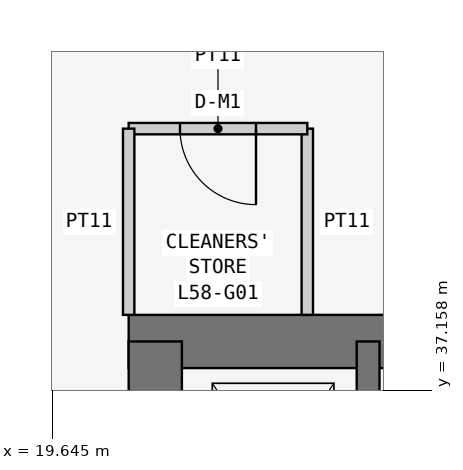
"""IFC4 building model, lengths in metres.
Left out: names, types, materials, properties, quantities, classifications, styles, units other than length and angle.
Written with IfcOpenShell. Run it as: python <this file> out.ifc"""

import sys

from ifc_helpers import new_model, si_unit, direction, frame, frame_2d, origin, place, context, subcontext, project, spatial, rectangle, extrude, element, fill, save


model = new_model("IFC4")
c1 = context("Model", 3, precision=1e-05, world=origin(), true_north=direction((0.0, 1.0)))
c2 = subcontext(c1, "Body", "Model", "MODEL_VIEW")
j1 = project(units=[si_unit("LENGTHUNIT", "METRE"), si_unit("PLANEANGLEUNIT", "RADIAN")], contexts=[c1])
p1 = place(None, origin())
s1 = spatial("IfcSite", under=j1, at=p1, CompositionType="ELEMENT")
p2 = place(p1, origin())
s2 = spatial("IfcBuilding", under=s1, at=p2, CompositionType="ELEMENT")
p3 = place(p2, frame((0.0, 0.0, 222.9)))
s3 = spatial("IfcBuildingStorey", under=s2, at=p3, CompositionType="ELEMENT", Elevation=222.9)
p4 = place(p3, frame((37.8, 37.8, 0.0), z_axis=(0.0, 0.0, 1.0), x_axis=(-1.0, 0.0, 0.0)))
e1 = element("IfcWall", 1, at=p4, inside=s3, PredefinedType="SHEAR", context=c2, shape_type="SweptSolid", body=[
    extrude(rectangle(XDim=17.15, YDim=0.7, at=frame_2d((8.575, 0.0))), origin(), (0.0, 0.0, 1.0), 3.6),
])
p5 = place(p3, frame((21.0, 37.8, 0.0), z_axis=(0.0, 0.0, 1.0), x_axis=(0.0, -1.0, 0.0)))
e2 = element("IfcWall", 2, at=p5, inside=s3, PredefinedType="SHEAR", context=c2, shape_type="SweptSolid", body=[
    extrude(rectangle(XDim=17.15, YDim=0.7, at=frame_2d((8.575, 0.0))), origin(), (0.0, 0.0, 1.0), 3.6),
])
p6 = place(p5, frame((5.4, 0.0, 0.0)))
e3 = element("IfcOpeningElement", 3, at=p6, cuts=e2, PredefinedType="OPENING", context=c2, shape_type="SweptSolid", body=[
    extrude(rectangle(XDim=1.2, YDim=2.1, at=frame_2d((0.6, 1.05))), frame((0.0, 0.36, 0.0), z_axis=(0.0, -1.0, 0.0), x_axis=(1.0, 0.0, 0.0)), (0.0, 0.0, 1.0), 0.72),
])
p7 = place(p3, frame((23.8, 34.6, 0.0), z_axis=(0.0, 0.0, 1.0), x_axis=(0.0, 1.0, 0.0)))
e4 = element("IfcWall", 4, at=p7, inside=s3, PredefinedType="SHEAR", context=c2, shape_type="SweptSolid", body=[
    extrude(rectangle(XDim=3.2, YDim=0.3, at=frame_2d((1.6, 0.0))), origin(), (0.0, 0.0, 1.0), 3.6),
])
p8 = place(p3, frame((23.0, 38.15, 0.0), z_axis=(0.0, 0.0, 1.0), x_axis=(0.0, 1.0, 0.0)))
e5 = element("IfcWall", 5, at=p8, inside=s3, PredefinedType="PARTITIONING", context=c2, shape_type="SweptSolid", body=[
    extrude(rectangle(XDim=2.45, YDim=0.15, at=frame_2d((1.225, 0.0))), origin(), (0.0, 0.0, 1.0), 3.45),
])
p9 = place(p3, frame((23.0, 40.6, 0.0), z_axis=(0.0, 0.0, 1.0), x_axis=(-1.0, 0.0, 0.0)))
e6 = element("IfcWall", 6, at=p9, inside=s3, PredefinedType="PARTITIONING", context=c2, shape_type="SweptSolid", body=[
    extrude(rectangle(XDim=2.35, YDim=0.15, at=frame_2d((1.175, 0.0))), origin(), (0.0, 0.0, 1.0), 3.45),
])
p10 = place(p9, frame((0.675, 0.0, 0.0)))
e7 = element("IfcOpeningElement", 7, at=p10, cuts=e6, PredefinedType="OPENING", context=c2, shape_type="SweptSolid", body=[
    extrude(rectangle(XDim=1.0, YDim=2.1, at=frame_2d((0.5, 1.05))), frame((0.0, 0.085, 0.0), z_axis=(0.0, -1.0, 0.0), x_axis=(1.0, 0.0, 0.0)), (0.0, 0.0, 1.0), 0.17),
])
p11 = place(p3, frame((20.65, 40.6, 0.0), z_axis=(0.0, 0.0, 1.0), x_axis=(0.0, -1.0, 0.0)))
e8 = element("IfcWall", 8, at=p11, inside=s3, PredefinedType="PARTITIONING", context=c2, shape_type="SweptSolid", body=[
    extrude(rectangle(XDim=2.45, YDim=0.15, at=frame_2d((1.225, 0.0))), origin(), (0.0, 0.0, 1.0), 3.45),
])
p12 = place(p10, origin())
e9 = element("IfcDoor", 9, at=p12, inside=s3, OperationType="SINGLE_SWING_LEFT", PredefinedType="DOOR", context=c2, shape_type="SweptSolid", body=[
    extrude(rectangle(XDim=1.0, YDim=2.1, at=frame_2d((0.5, 1.05))), frame((0.0, 0.025, 0.0), z_axis=(0.0, -1.0, 0.0), x_axis=(1.0, 0.0, 0.0)), (0.0, 0.0, 1.0), 0.05),
])
fill(e7, e9)
save(model, sys.argv[1])
